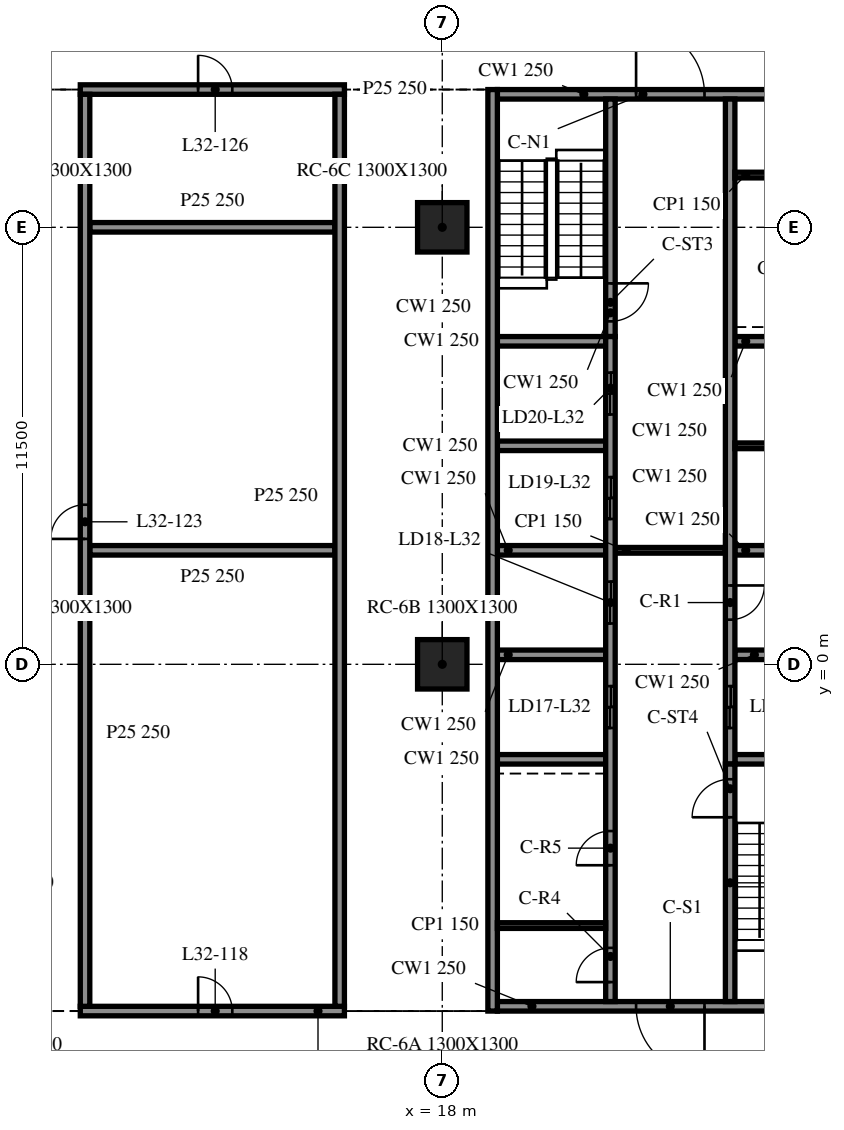
"""IFC4 building model, lengths in metres.
Left out: names, types, materials, properties, quantities, classifications, styles, units other than length and angle.
Written with IfcOpenShell. Run it as: python <this file> out.ifc"""

import sys

from ifc_helpers import new_model, si_unit, direction, frame, frame_2d, origin, origin_2d, place, context, subcontext, project, spatial, rectangle, extrude, element, fill, save


model = new_model("IFC4")
c1 = context("Model", 3, precision=1e-05, world=origin(), true_north=direction((0.0, 1.0)))
c2 = subcontext(c1, "Body", "Model", "MODEL_VIEW")
j1 = project(units=[si_unit("LENGTHUNIT", "METRE"), si_unit("PLANEANGLEUNIT", "RADIAN")], contexts=[c1])
p1 = place(None, origin())
s1 = spatial("IfcSite", under=j1, at=p1, CompositionType="ELEMENT")
p2 = place(p1, origin())
s2 = spatial("IfcBuilding", under=s1, at=p2, CompositionType="ELEMENT")
p3 = place(p2, frame((0.0, 0.0, 138.4)))
s3 = spatial("IfcBuildingStorey", under=s2, at=p3, CompositionType="ELEMENT", Elevation=138.4)
for number, where, z_axis, x_axis in (
    (1, (18.0, 0.0, -0.34), (0.0, 0.0, 1.0), (1.0, 0.0, 0.0)),
    (2, (18.0, 11.5, -0.34), (0.0, 0.0, 1.0), (1.0, 0.0, 0.0)),
):
    element("IfcColumn", number, at=place(p3, frame(where, z_axis=z_axis, x_axis=x_axis)), inside=s3, PredefinedType="COLUMN", context=c2, shape_type="SweptSolid", body=[
        extrude(rectangle(XDim=1.3, YDim=1.3, at=origin_2d()), origin(), (0.0, 0.0, 1.0), 4.1),
    ])
p4 = place(p3, frame((19.325, 15.125, 0.0), z_axis=(0.0, 0.0, 1.0), x_axis=(0.0, -1.0, 0.0)))
e3 = element("IfcWall", 3, at=p4, inside=s3, PredefinedType="SOLIDWALL", context=c2, shape_type="SweptSolid", body=[
    extrude(rectangle(XDim=24.25, YDim=0.25, at=frame_2d((12.125, 0.0))), origin(), (0.0, 0.0, 1.0), 3.76),
])
p5 = place(p3, frame((28.55, -9.0, 0.0), z_axis=(0.0, 0.0, 1.0), x_axis=(-1.0, 0.0, 0.0)))
e4 = element("IfcWall", 4, at=p5, inside=s3, PredefinedType="SOLIDWALL", context=c2, shape_type="SweptSolid", body=[
    extrude(rectangle(XDim=9.1, YDim=0.25, at=frame_2d((4.55, 0.0))), origin(), (0.0, 0.0, 1.0), 3.76),
])
p6 = place(p5, frame((3.65, 0.0, 0.0)))
e5 = element("IfcOpeningElement", 5, at=p6, cuts=e4, PredefinedType="OPENING", context=c2, shape_type="SweptSolid", body=[
    extrude(rectangle(XDim=1.8, YDim=2.1, at=frame_2d((0.9, 1.05))), frame((0.0, 0.135, 0.0), z_axis=(0.0, -1.0, 0.0), x_axis=(1.0, 0.0, 0.0)), (0.0, 0.0, 1.0), 0.27),
])
p7 = place(p3, frame((19.45, 15.0, 0.0), z_axis=(0.0, 0.0, 1.0), x_axis=(1.0, 0.0, 0.0)))
e6 = element("IfcWall", 6, at=p7, inside=s3, PredefinedType="SOLIDWALL", context=c2, shape_type="SweptSolid", body=[
    extrude(rectangle(XDim=9.1, YDim=0.25, at=frame_2d((4.55, 0.0))), origin(), (0.0, 0.0, 1.0), 3.76),
])
p8 = place(p7, frame((3.65, 0.0, 0.0)))
e7 = element("IfcOpeningElement", 7, at=p8, cuts=e6, PredefinedType="OPENING", context=c2, shape_type="SweptSolid", body=[
    extrude(rectangle(XDim=1.8, YDim=2.1, at=frame_2d((0.9, 1.05))), frame((0.0, 0.135, 0.0), z_axis=(0.0, -1.0, 0.0), x_axis=(1.0, 0.0, 0.0)), (0.0, 0.0, 1.0), 0.27),
])
p9 = place(p3, frame((22.425, -8.875, 0.0), z_axis=(0.0, 0.0, 1.0), x_axis=(0.0, 1.0, 0.0)))
e8 = element("IfcWall", 8, at=p9, inside=s3, PredefinedType="SOLIDWALL", context=c2, shape_type="SweptSolid", body=[
    extrude(rectangle(XDim=17.5, YDim=0.25, at=frame_2d((8.75, 0.0))), origin(), (0.0, 0.0, 1.0), 3.76),
])
p10 = place(p9, frame((7.2, 0.0, 0.0)))
e9 = element("IfcOpeningElement", 9, at=p10, cuts=e8, PredefinedType="OPENING", context=c2, shape_type="SweptSolid", body=[
    extrude(rectangle(XDim=1.1, YDim=2.1, at=frame_2d((0.55, 1.05))), frame((0.0, 0.135, 0.0), z_axis=(0.0, -1.0, 0.0), x_axis=(1.0, 0.0, 0.0)), (0.0, 0.0, 1.0), 0.27),
])
p11 = place(p9, frame((9.95, 0.0, 0.0)))
e10 = element("IfcOpeningElement", 10, at=p11, cuts=e8, PredefinedType="OPENING", context=c2, shape_type="SweptSolid", body=[
    extrude(rectangle(XDim=1.1, YDim=2.1, at=frame_2d((0.55, 1.05))), frame((0.0, 0.135, 0.0), z_axis=(0.0, -1.0, 0.0), x_axis=(1.0, 0.0, 0.0)), (0.0, 0.0, 1.0), 0.27),
])
p12 = place(p9, frame((12.7, 0.0, 0.0)))
e11 = element("IfcOpeningElement", 11, at=p12, cuts=e8, PredefinedType="OPENING", context=c2, shape_type="SweptSolid", body=[
    extrude(rectangle(XDim=1.1, YDim=2.1, at=frame_2d((0.55, 1.05))), frame((0.0, 0.135, 0.0), z_axis=(0.0, -1.0, 0.0), x_axis=(1.0, 0.0, 0.0)), (0.0, 0.0, 1.0), 0.27),
])
p13 = place(p9, frame((15.45, 0.0, 0.0)))
e12 = element("IfcOpeningElement", 12, at=p13, cuts=e8, PredefinedType="OPENING", context=c2, shape_type="SweptSolid", body=[
    extrude(rectangle(XDim=1.1, YDim=2.1, at=frame_2d((0.55, 1.05))), frame((0.0, 0.135, 0.0), z_axis=(0.0, -1.0, 0.0), x_axis=(1.0, 0.0, 0.0)), (0.0, 0.0, 1.0), 0.27),
])
p14 = place(p9, frame((0.512, 0.0, 0.0)))
e13 = element("IfcOpeningElement", 13, at=p14, cuts=e8, PredefinedType="OPENING", context=c2, shape_type="SweptSolid", body=[
    extrude(rectangle(XDim=0.9, YDim=2.1, at=frame_2d((0.45, 1.05))), frame((0.0, 0.135, 0.0), z_axis=(0.0, -1.0, 0.0), x_axis=(1.0, 0.0, 0.0)), (0.0, 0.0, 1.0), 0.27),
])
p15 = place(p9, frame((3.587, 0.0, 0.0)))
e14 = element("IfcOpeningElement", 14, at=p15, cuts=e8, PredefinedType="OPENING", context=c2, shape_type="SweptSolid", body=[
    extrude(rectangle(XDim=0.9, YDim=2.1, at=frame_2d((0.45, 1.05))), frame((0.0, 0.135, 0.0), z_axis=(0.0, -1.0, 0.0), x_axis=(1.0, 0.0, 0.0)), (0.0, 0.0, 1.0), 0.27),
])
p16 = place(p3, frame((22.425, 14.875, 0.0), z_axis=(0.0, 0.0, 1.0), x_axis=(0.0, -1.0, 0.0)))
e15 = element("IfcWall", 15, at=p16, inside=s3, PredefinedType="SOLIDWALL", context=c2, shape_type="SweptSolid", body=[
    extrude(rectangle(XDim=6.25, YDim=0.25, at=frame_2d((3.125, 0.0))), origin(), (0.0, 0.0, 1.0), 3.76),
])
p17 = place(p16, frame((4.85, 0.0, 0.0)))
e16 = element("IfcOpeningElement", 16, at=p17, cuts=e15, PredefinedType="OPENING", context=c2, shape_type="SweptSolid", body=[
    extrude(rectangle(XDim=1.0, YDim=2.1, at=frame_2d((0.5, 1.05))), frame((0.0, 0.135, 0.0), z_axis=(0.0, -1.0, 0.0), x_axis=(1.0, 0.0, 0.0)), (0.0, 0.0, 1.0), 0.27),
])
p18 = place(p3, frame((25.575, -8.875, 0.0), z_axis=(0.0, 0.0, 1.0), x_axis=(0.0, 1.0, 0.0)))
e17 = element("IfcWall", 17, at=p18, inside=s3, PredefinedType="SOLIDWALL", context=c2, shape_type="SweptSolid", body=[
    extrude(rectangle(XDim=6.25, YDim=0.25, at=frame_2d((3.125, 0.0))), origin(), (0.0, 0.0, 1.0), 3.76),
])
p19 = place(p18, frame((4.85, 0.0, 0.0)))
e18 = element("IfcOpeningElement", 18, at=p19, cuts=e17, PredefinedType="OPENING", context=c2, shape_type="SweptSolid", body=[
    extrude(rectangle(XDim=1.0, YDim=2.1, at=frame_2d((0.5, 1.05))), frame((0.0, 0.135, 0.0), z_axis=(0.0, -1.0, 0.0), x_axis=(1.0, 0.0, 0.0)), (0.0, 0.0, 1.0), 0.27),
])
p20 = place(p3, frame((25.575, 14.875, 0.0), z_axis=(0.0, 0.0, 1.0), x_axis=(0.0, -1.0, 0.0)))
e19 = element("IfcWall", 19, at=p20, inside=s3, PredefinedType="SOLIDWALL", context=c2, shape_type="SweptSolid", body=[
    extrude(rectangle(XDim=17.5, YDim=0.25, at=frame_2d((8.75, 0.0))), origin(), (0.0, 0.0, 1.0), 3.76),
])
p21 = place(p20, frame((15.45, 0.0, 0.0)))
e20 = element("IfcOpeningElement", 20, at=p21, cuts=e19, PredefinedType="OPENING", context=c2, shape_type="SweptSolid", body=[
    extrude(rectangle(XDim=1.1, YDim=2.1, at=frame_2d((0.55, 1.05))), frame((0.0, 0.135, 0.0), z_axis=(0.0, -1.0, 0.0), x_axis=(1.0, 0.0, 0.0)), (0.0, 0.0, 1.0), 0.27),
])
p22 = place(p20, frame((12.8, 0.0, 0.0)))
e21 = element("IfcOpeningElement", 21, at=p22, cuts=e19, PredefinedType="OPENING", context=c2, shape_type="SweptSolid", body=[
    extrude(rectangle(XDim=0.9, YDim=2.1, at=frame_2d((0.45, 1.05))), frame((0.0, 0.135, 0.0), z_axis=(0.0, -1.0, 0.0), x_axis=(1.0, 0.0, 0.0)), (0.0, 0.0, 1.0), 0.27),
])
for number, where, z_axis, x_axis in (
    (22, (19.45, -2.5, 0.0), (0.0, 0.0, 1.0), (1.0, 0.0, 0.0)),
    (23, (19.45, 0.25, 0.0), (0.0, 0.0, 1.0), (1.0, 0.0, 0.0)),
    (24, (19.45, 3.0, 0.0), (0.0, 0.0, 1.0), (1.0, 0.0, 0.0)),
    (25, (19.45, 5.75, 0.0), (0.0, 0.0, 1.0), (1.0, 0.0, 0.0)),
    (26, (19.45, 8.5, 0.0), (0.0, 0.0, 1.0), (1.0, 0.0, 0.0)),
    (27, (25.7, -2.5, 0.0), (0.0, 0.0, 1.0), (1.0, 0.0, 0.0)),
    (28, (25.7, 0.25, 0.0), (0.0, 0.0, 1.0), (1.0, 0.0, 0.0)),
    (29, (25.7, 3.0, 0.0), (0.0, 0.0, 1.0), (1.0, 0.0, 0.0)),
    (30, (25.7, 8.5, 0.0), (0.0, 0.0, 1.0), (1.0, 0.0, 0.0)),
):
    element("IfcWall", number, at=place(p3, frame(where, z_axis=z_axis, x_axis=x_axis)), inside=s3, PredefinedType="SOLIDWALL", context=c2, shape_type="SweptSolid", body=[
        extrude(rectangle(XDim=2.85, YDim=0.25, at=frame_2d((1.425, 0.0))), origin(), (0.0, 0.0, 1.0), 3.76),
    ])
p23 = place(p3, frame((22.55, 3.0, 0.0), z_axis=(0.0, 0.0, 1.0), x_axis=(1.0, 0.0, 0.0)))
e31 = element("IfcWall", 31, at=p23, inside=s3, PredefinedType="PARTITIONING", context=c2, shape_type="SweptSolid", body=[
    extrude(rectangle(XDim=2.9, YDim=0.15, at=frame_2d((1.45, 0.0))), origin(), (0.0, 0.0, 1.0), 3.76),
])
for number, where, z_axis, x_axis in (
    (32, (25.7, 5.75, 0.0), (0.0, 0.0, 1.0), (1.0, 0.0, 0.0)),
    (33, (19.45, -6.875, 0.0), (0.0, 0.0, 1.0), (1.0, 0.0, 0.0)),
    (34, (25.7, 12.875, 0.0), (0.0, 0.0, 1.0), (1.0, 0.0, 0.0)),
):
    element("IfcWall", number, at=place(p3, frame(where, z_axis=z_axis, x_axis=x_axis)), inside=s3, PredefinedType="PARTITIONING", context=c2, shape_type="SweptSolid", body=[
        extrude(rectangle(XDim=2.85, YDim=0.15, at=frame_2d((1.425, 0.0))), origin(), (0.0, 0.0, 1.0), 3.76),
    ])
p24 = place(p3, frame((8.475, -9.125, 0.0), z_axis=(0.0, 0.0, 1.0), x_axis=(1.0, 0.0, 0.0)))
e35 = element("IfcWall", 35, at=p24, inside=s3, PredefinedType="PARTITIONING", context=c2, shape_type="SweptSolid", body=[
    extrude(rectangle(XDim=6.95, YDim=0.25, at=frame_2d((3.475, 0.0))), origin(), (0.0, 0.0, 1.0), 3.76),
])
p25 = place(p24, frame((3.1, 0.0, 0.0)))
e36 = element("IfcOpeningElement", 36, at=p25, cuts=e35, PredefinedType="OPENING", context=c2, shape_type="SweptSolid", body=[
    extrude(rectangle(XDim=0.9, YDim=2.1, at=frame_2d((0.45, 1.05))), frame((0.0, 0.135, 0.0), z_axis=(0.0, -1.0, 0.0), x_axis=(1.0, 0.0, 0.0)), (0.0, 0.0, 1.0), 0.27),
])
for number, where, z_axis, x_axis in (
    (37, (8.725, 3.0, 0.0), (0.0, 0.0, 1.0), (1.0, 0.0, 0.0)),
    (38, (8.725, 11.5, 0.0), (0.0, 0.0, 1.0), (1.0, 0.0, 0.0)),
):
    element("IfcWall", number, at=place(p3, frame(where, z_axis=z_axis, x_axis=x_axis)), inside=s3, PredefinedType="PARTITIONING", context=c2, shape_type="SweptSolid", body=[
        extrude(rectangle(XDim=6.45, YDim=0.25, at=frame_2d((3.225, 0.0))), origin(), (0.0, 0.0, 1.0), 3.76),
    ])
p26 = place(p3, frame((8.475, 15.125, 0.0), z_axis=(0.0, 0.0, 1.0), x_axis=(1.0, 0.0, 0.0)))
e39 = element("IfcWall", 39, at=p26, inside=s3, PredefinedType="PARTITIONING", context=c2, shape_type="SweptSolid", body=[
    extrude(rectangle(XDim=6.95, YDim=0.25, at=frame_2d((3.475, 0.0))), origin(), (0.0, 0.0, 1.0), 3.76),
])
p27 = place(p26, frame((3.1, 0.0, 0.0)))
e40 = element("IfcOpeningElement", 40, at=p27, cuts=e39, PredefinedType="OPENING", context=c2, shape_type="SweptSolid", body=[
    extrude(rectangle(XDim=0.9, YDim=2.1, at=frame_2d((0.45, 1.05))), frame((0.0, 0.135, 0.0), z_axis=(0.0, -1.0, 0.0), x_axis=(1.0, 0.0, 0.0)), (0.0, 0.0, 1.0), 0.27),
])
p28 = place(p3, frame((8.6, -9.0, 0.0), z_axis=(0.0, 0.0, 1.0), x_axis=(0.0, 1.0, 0.0)))
e41 = element("IfcWall", 41, at=p28, inside=s3, PredefinedType="PARTITIONING", context=c2, shape_type="SweptSolid", body=[
    extrude(rectangle(XDim=24.0, YDim=0.25, at=frame_2d((12.0, 0.0))), origin(), (0.0, 0.0, 1.0), 3.76),
])
p29 = place(p28, frame((12.3, 0.0, 0.0)))
e42 = element("IfcOpeningElement", 42, at=p29, cuts=e41, PredefinedType="OPENING", context=c2, shape_type="SweptSolid", body=[
    extrude(rectangle(XDim=0.9, YDim=2.1, at=frame_2d((0.45, 1.05))), frame((0.0, 0.135, 0.0), z_axis=(0.0, -1.0, 0.0), x_axis=(1.0, 0.0, 0.0)), (0.0, 0.0, 1.0), 0.27),
])
p30 = place(p3, frame((15.3, -9.0, 0.0), z_axis=(0.0, 0.0, 1.0), x_axis=(0.0, 1.0, 0.0)))
e43 = element("IfcWall", 43, at=p30, inside=s3, PredefinedType="PARTITIONING", context=c2, shape_type="SweptSolid", body=[
    extrude(rectangle(XDim=24.0, YDim=0.25, at=frame_2d((12.0, 0.0))), origin(), (0.0, 0.0, 1.0), 3.76),
])
p31 = place(p6, origin())
e44 = element("IfcDoor", 44, at=p31, inside=s3, OperationType="DOUBLE_DOOR_SINGLE_SWING", PredefinedType="DOOR", context=c2, shape_type="SweptSolid", body=[
    extrude(rectangle(XDim=1.8, YDim=2.1, at=frame_2d((0.9, 1.05))), frame((0.0, 0.025, 0.0), z_axis=(0.0, -1.0, 0.0), x_axis=(1.0, 0.0, 0.0)), (0.0, 0.0, 1.0), 0.05),
])
fill(e5, e44)
p32 = place(p8, origin())
e45 = element("IfcDoor", 45, at=p32, inside=s3, OperationType="DOUBLE_DOOR_SINGLE_SWING", PredefinedType="DOOR", context=c2, shape_type="SweptSolid", body=[
    extrude(rectangle(XDim=1.8, YDim=2.1, at=frame_2d((0.9, 1.05))), frame((0.0, 0.025, 0.0), z_axis=(0.0, -1.0, 0.0), x_axis=(1.0, 0.0, 0.0)), (0.0, 0.0, 1.0), 0.05),
])
fill(e7, e45)
p33 = place(p21, origin())
e46 = element("IfcDoor", 46, at=p33, inside=s3, OperationType="DOUBLE_DOOR_SLIDING", PredefinedType="DOOR", context=c2, shape_type="SweptSolid", body=[
    extrude(rectangle(XDim=1.1, YDim=2.1, at=frame_2d((0.55, 1.05))), frame((0.0, 0.025, 0.0), z_axis=(0.0, -1.0, 0.0), x_axis=(1.0, 0.0, 0.0)), (0.0, 0.0, 1.0), 0.05),
])
fill(e20, e46)
p34 = place(p10, origin())
e47 = element("IfcDoor", 47, at=p34, inside=s3, OperationType="DOUBLE_DOOR_SLIDING", PredefinedType="DOOR", context=c2, shape_type="SweptSolid", body=[
    extrude(rectangle(XDim=1.1, YDim=2.1, at=frame_2d((0.55, 1.05))), frame((0.0, 0.025, 0.0), z_axis=(0.0, -1.0, 0.0), x_axis=(1.0, 0.0, 0.0)), (0.0, 0.0, 1.0), 0.05),
])
fill(e9, e47)
p35 = place(p11, origin())
e48 = element("IfcDoor", 48, at=p35, inside=s3, OperationType="DOUBLE_DOOR_SLIDING", PredefinedType="DOOR", context=c2, shape_type="SweptSolid", body=[
    extrude(rectangle(XDim=1.1, YDim=2.1, at=frame_2d((0.55, 1.05))), frame((0.0, 0.025, 0.0), z_axis=(0.0, -1.0, 0.0), x_axis=(1.0, 0.0, 0.0)), (0.0, 0.0, 1.0), 0.05),
])
fill(e10, e48)
p36 = place(p12, origin())
e49 = element("IfcDoor", 49, at=p36, inside=s3, OperationType="DOUBLE_DOOR_SLIDING", PredefinedType="DOOR", context=c2, shape_type="SweptSolid", body=[
    extrude(rectangle(XDim=1.1, YDim=2.1, at=frame_2d((0.55, 1.05))), frame((0.0, 0.025, 0.0), z_axis=(0.0, -1.0, 0.0), x_axis=(1.0, 0.0, 0.0)), (0.0, 0.0, 1.0), 0.05),
])
fill(e11, e49)
p37 = place(p13, origin())
e50 = element("IfcDoor", 50, at=p37, inside=s3, OperationType="DOUBLE_DOOR_SLIDING", PredefinedType="DOOR", context=c2, shape_type="SweptSolid", body=[
    extrude(rectangle(XDim=1.1, YDim=2.1, at=frame_2d((0.55, 1.05))), frame((0.0, 0.025, 0.0), z_axis=(0.0, -1.0, 0.0), x_axis=(1.0, 0.0, 0.0)), (0.0, 0.0, 1.0), 0.05),
])
fill(e12, e50)
p38 = place(p22, origin())
e51 = element("IfcDoor", 51, at=p38, inside=s3, OperationType="SINGLE_SWING_LEFT", PredefinedType="DOOR", context=c2, shape_type="SweptSolid", body=[
    extrude(rectangle(XDim=0.9, YDim=2.1, at=frame_2d((0.45, 1.05))), frame((0.0, 0.025, 0.0), z_axis=(0.0, -1.0, 0.0), x_axis=(1.0, 0.0, 0.0)), (0.0, 0.0, 1.0), 0.05),
])
fill(e21, e51)
p39 = place(p14, origin())
e52 = element("IfcDoor", 52, at=p39, inside=s3, OperationType="SINGLE_SWING_RIGHT", PredefinedType="DOOR", context=c2, shape_type="SweptSolid", body=[
    extrude(rectangle(XDim=0.9, YDim=2.1, at=frame_2d((0.45, 1.05))), frame((0.0, 0.025, 0.0), z_axis=(0.0, -1.0, 0.0), x_axis=(1.0, 0.0, 0.0)), (0.0, 0.0, 1.0), 0.05),
])
fill(e13, e52)
p40 = place(p15, origin())
e53 = element("IfcDoor", 53, at=p40, inside=s3, OperationType="SINGLE_SWING_LEFT", PredefinedType="DOOR", context=c2, shape_type="SweptSolid", body=[
    extrude(rectangle(XDim=0.9, YDim=2.1, at=frame_2d((0.45, 1.05))), frame((0.0, 0.025, 0.0), z_axis=(0.0, -1.0, 0.0), x_axis=(1.0, 0.0, 0.0)), (0.0, 0.0, 1.0), 0.05),
])
fill(e14, e53)
p41 = place(p17, origin())
e54 = element("IfcDoor", 54, at=p41, inside=s3, OperationType="SINGLE_SWING_RIGHT", PredefinedType="DOOR", context=c2, shape_type="SweptSolid", body=[
    extrude(rectangle(XDim=1.0, YDim=2.1, at=frame_2d((0.5, 1.05))), frame((0.0, 0.025, 0.0), z_axis=(0.0, -1.0, 0.0), x_axis=(1.0, 0.0, 0.0)), (0.0, 0.0, 1.0), 0.05),
])
fill(e16, e54)
p42 = place(p19, origin())
e55 = element("IfcDoor", 55, at=p42, inside=s3, OperationType="SINGLE_SWING_LEFT", PredefinedType="DOOR", context=c2, shape_type="SweptSolid", body=[
    extrude(rectangle(XDim=1.0, YDim=2.1, at=frame_2d((0.5, 1.05))), frame((0.0, 0.025, 0.0), z_axis=(0.0, -1.0, 0.0), x_axis=(1.0, 0.0, 0.0)), (0.0, 0.0, 1.0), 0.05),
])
fill(e18, e55)
p43 = place(p25, origin())
e56 = element("IfcDoor", 56, at=p43, inside=s3, OperationType="SINGLE_SWING_RIGHT", PredefinedType="DOOR", context=c2, shape_type="SweptSolid", body=[
    extrude(rectangle(XDim=0.9, YDim=2.1, at=frame_2d((0.45, 1.05))), frame((0.0, 0.025, 0.0), z_axis=(0.0, -1.0, 0.0), x_axis=(1.0, 0.0, 0.0)), (0.0, 0.0, 1.0), 0.05),
])
fill(e36, e56)
p44 = place(p29, origin())
e57 = element("IfcDoor", 57, at=p44, inside=s3, OperationType="SINGLE_SWING_LEFT", PredefinedType="DOOR", context=c2, shape_type="SweptSolid", body=[
    extrude(rectangle(XDim=0.9, YDim=2.1, at=frame_2d((0.45, 1.05))), frame((0.0, 0.025, 0.0), z_axis=(0.0, -1.0, 0.0), x_axis=(1.0, 0.0, 0.0)), (0.0, 0.0, 1.0), 0.05),
])
fill(e42, e57)
p45 = place(p27, origin())
e58 = element("IfcDoor", 58, at=p45, inside=s3, OperationType="SINGLE_SWING_LEFT", PredefinedType="DOOR", context=c2, shape_type="SweptSolid", body=[
    extrude(rectangle(XDim=0.9, YDim=2.1, at=frame_2d((0.45, 1.05))), frame((0.0, 0.025, 0.0), z_axis=(0.0, -1.0, 0.0), x_axis=(1.0, 0.0, 0.0)), (0.0, 0.0, 1.0), 0.05),
])
fill(e40, e58)
save(model, sys.argv[1])
